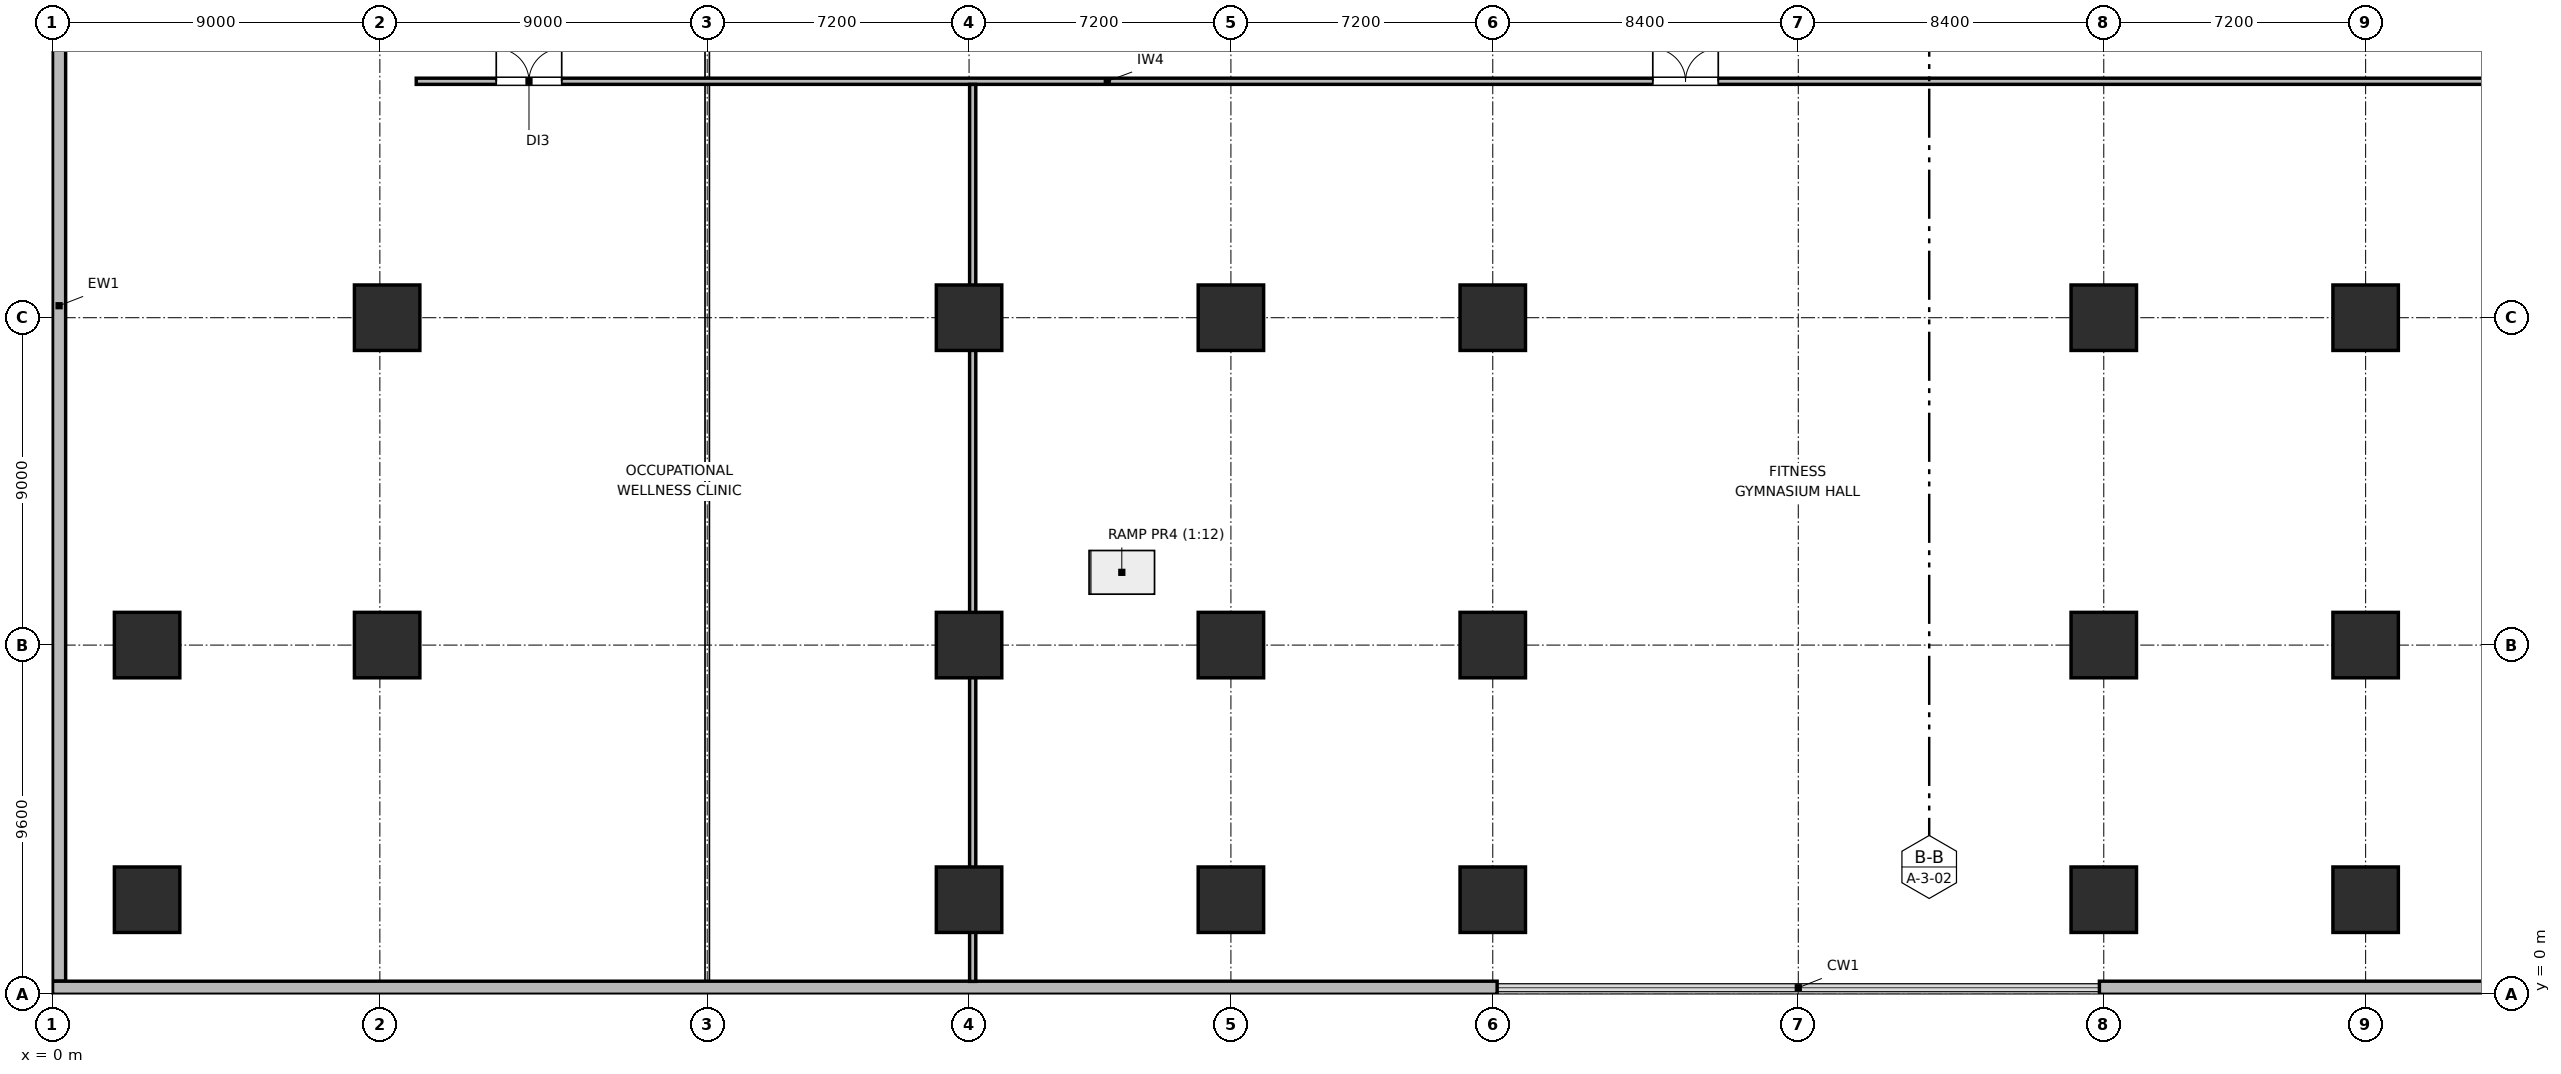
"""IFC4 building model, lengths in metres.
Left out: names, types, materials, properties, quantities, classifications, styles, units other than length and angle.
Written with IfcOpenShell. Run it as: python <this file> out.ifc"""

import sys

from ifc_helpers import new_model, si_unit, direction, frame, frame_2d, origin, origin_2d, place, context, subcontext, project, spatial, rectangle, extrude, element, fill, save


model = new_model("IFC4")
c1 = context("Model", 3, precision=1e-05, world=origin(), true_north=direction((0.0, 1.0)))
c2 = subcontext(c1, "Body", "Model", "MODEL_VIEW")
j1 = project(units=[si_unit("LENGTHUNIT", "METRE"), si_unit("PLANEANGLEUNIT", "RADIAN")], contexts=[c1])
p1 = place(None, origin())
s1 = spatial("IfcSite", under=j1, at=p1, CompositionType="ELEMENT")
p2 = place(p1, origin())
s2 = spatial("IfcBuilding", under=s1, at=p2, CompositionType="ELEMENT")
p3 = place(p2, frame((0.0, 0.0, 12.9)))
s3 = spatial("IfcBuildingStorey", under=s2, at=p3, CompositionType="ELEMENT", Elevation=12.9)
for number, where, z_axis, x_axis in (
    (1, (2.6, 2.6, 0.0), (0.0, 0.0, 1.0), (1.0, 0.0, 0.0)),
    (2, (2.6, 9.6, 0.0), (0.0, 0.0, 1.0), (1.0, 0.0, 0.0)),
    (3, (9.2, 9.6, 0.0), (0.0, 0.0, 1.0), (1.0, 0.0, 0.0)),
    (4, (9.2, 18.6, 0.0), (0.0, 0.0, 1.0), (1.0, 0.0, 0.0)),
    (5, (25.2, 2.6, 0.0), (0.0, 0.0, 1.0), (1.0, 0.0, 0.0)),
    (6, (25.2, 9.6, 0.0), (0.0, 0.0, 1.0), (1.0, 0.0, 0.0)),
    (7, (25.2, 18.6, 0.0), (0.0, 0.0, 1.0), (1.0, 0.0, 0.0)),
    (8, (32.4, 2.6, 0.0), (0.0, 0.0, 1.0), (1.0, 0.0, 0.0)),
    (9, (32.4, 9.6, 0.0), (0.0, 0.0, 1.0), (1.0, 0.0, 0.0)),
    (10, (32.4, 18.6, 0.0), (0.0, 0.0, 1.0), (1.0, 0.0, 0.0)),
    (11, (39.6, 2.6, 0.0), (0.0, 0.0, 1.0), (1.0, 0.0, 0.0)),
    (12, (39.6, 9.6, 0.0), (0.0, 0.0, 1.0), (1.0, 0.0, 0.0)),
    (13, (39.6, 18.6, 0.0), (0.0, 0.0, 1.0), (1.0, 0.0, 0.0)),
    (14, (56.4, 2.6, 0.0), (0.0, 0.0, 1.0), (1.0, 0.0, 0.0)),
    (15, (56.4, 9.6, 0.0), (0.0, 0.0, 1.0), (1.0, 0.0, 0.0)),
    (16, (56.4, 18.6, 0.0), (0.0, 0.0, 1.0), (1.0, 0.0, 0.0)),
    (17, (63.6, 2.6, 0.0), (0.0, 0.0, 1.0), (1.0, 0.0, 0.0)),
    (18, (63.6, 9.6, 0.0), (0.0, 0.0, 1.0), (1.0, 0.0, 0.0)),
    (19, (63.6, 18.6, 0.0), (0.0, 0.0, 1.0), (1.0, 0.0, 0.0)),
):
    element("IfcColumn", number, at=place(p3, frame(where, z_axis=z_axis, x_axis=x_axis)), inside=s3, PredefinedType="COLUMN", context=c2, shape_type="SweptSolid", body=[
        extrude(rectangle(XDim=1.8, YDim=1.8, at=origin_2d()), origin(), (0.0, 0.0, 1.0), 4.2),
    ])
p4 = place(p3, frame((0.18, 0.36, 0.0), z_axis=(0.0, 0.0, 1.0), x_axis=(0.0, 1.0, 0.0)))
e20 = element("IfcWall", 20, at=p4, inside=s3, PredefinedType="SOLIDWALL", context=c2, shape_type="SweptSolid", body=[
    extrude(rectangle(XDim=71.28, YDim=0.36, at=frame_2d((35.64, 0.0))), origin(), (0.0, 0.0, 1.0), 3.84),
])
for number, where, z_axis, x_axis in (
    (21, (96.0, 0.18, 0.0), (0.0, 0.0, 1.0), (-1.0, 0.0, 0.0)),
    (22, (39.72, 0.18, 0.0), (0.0, 0.0, 1.0), (-1.0, 0.0, 0.0)),
):
    element("IfcWall", number, at=place(p3, frame(where, z_axis=z_axis, x_axis=x_axis)), inside=s3, PredefinedType="SOLIDWALL", context=c2, shape_type="SweptSolid", body=[
        extrude(rectangle(XDim=39.72, YDim=0.36, at=frame_2d((19.86, 0.0))), origin(), (0.0, 0.0, 1.0), 3.84),
    ])
p5 = place(p3, frame((10.0, 25.1, 0.0), z_axis=(0.0, 0.0, 1.0), x_axis=(1.0, 0.0, 0.0)))
e23 = element("IfcWall", 23, at=p5, inside=s3, PredefinedType="PARTITIONING", context=c2, shape_type="SweptSolid", body=[
    extrude(rectangle(XDim=76.0, YDim=0.17, at=frame_2d((38.0, 0.0))), origin(), (0.0, 0.0, 1.0), 3.84),
])
p6 = place(p5, frame((2.2, 0.0, 0.0)))
e24 = element("IfcOpeningElement", 24, at=p6, cuts=e23, PredefinedType="OPENING", context=c2, shape_type="SweptSolid", body=[
    extrude(rectangle(XDim=1.8, YDim=2.06, at=frame_2d((0.9, 1.03))), frame((0.0, 0.095, 0.0), z_axis=(0.0, -1.0, 0.0), x_axis=(1.0, 0.0, 0.0)), (0.0, 0.0, 1.0), 0.19),
])
p7 = place(p5, frame((34.0, 0.0, 0.0)))
e25 = element("IfcOpeningElement", 25, at=p7, cuts=e23, PredefinedType="OPENING", context=c2, shape_type="SweptSolid", body=[
    extrude(rectangle(XDim=1.8, YDim=2.06, at=frame_2d((0.9, 1.03))), frame((0.0, 0.095, 0.0), z_axis=(0.0, -1.0, 0.0), x_axis=(1.0, 0.0, 0.0)), (0.0, 0.0, 1.0), 0.19),
])
p8 = place(p5, frame((64.0, 0.0, 0.0)))
e26 = element("IfcOpeningElement", 26, at=p8, cuts=e23, PredefinedType="OPENING", context=c2, shape_type="SweptSolid", body=[
    extrude(rectangle(XDim=1.1, YDim=2.05, at=frame_2d((0.55, 1.025))), frame((0.0, 0.095, 0.0), z_axis=(0.0, -1.0, 0.0), x_axis=(1.0, 0.0, 0.0)), (0.0, 0.0, 1.0), 0.19),
])
p9 = place(p3, frame((25.3, 0.355, 0.0), z_axis=(0.0, 0.0, 1.0), x_axis=(0.0, 1.0, 0.0)))
e27 = element("IfcWall", 27, at=p9, inside=s3, PredefinedType="PARTITIONING", context=c2, shape_type="SweptSolid", body=[
    extrude(rectangle(XDim=24.658, YDim=0.17, at=frame_2d((12.329, 0.0))), origin(), (0.0, 0.0, 1.0), 3.052),
])
p10 = place(p6, origin())
e28 = element("IfcDoor", 28, at=p10, inside=s3, OperationType="DOUBLE_DOOR_SINGLE_SWING", PredefinedType="DOOR", context=c2, shape_type="SweptSolid", body=[
    extrude(rectangle(XDim=1.8, YDim=2.06, at=frame_2d((0.9, 1.03))), frame((0.0, 0.025, 0.0), z_axis=(0.0, -1.0, 0.0), x_axis=(1.0, 0.0, 0.0)), (0.0, 0.0, 1.0), 0.05),
])
fill(e24, e28)
p11 = place(p7, origin())
e29 = element("IfcDoor", 29, at=p11, inside=s3, OperationType="DOUBLE_DOOR_SINGLE_SWING", PredefinedType="DOOR", context=c2, shape_type="SweptSolid", body=[
    extrude(rectangle(XDim=1.8, YDim=2.06, at=frame_2d((0.9, 1.03))), frame((0.0, 0.025, 0.0), z_axis=(0.0, -1.0, 0.0), x_axis=(1.0, 0.0, 0.0)), (0.0, 0.0, 1.0), 0.05),
])
fill(e25, e29)
save(model, sys.argv[1])
